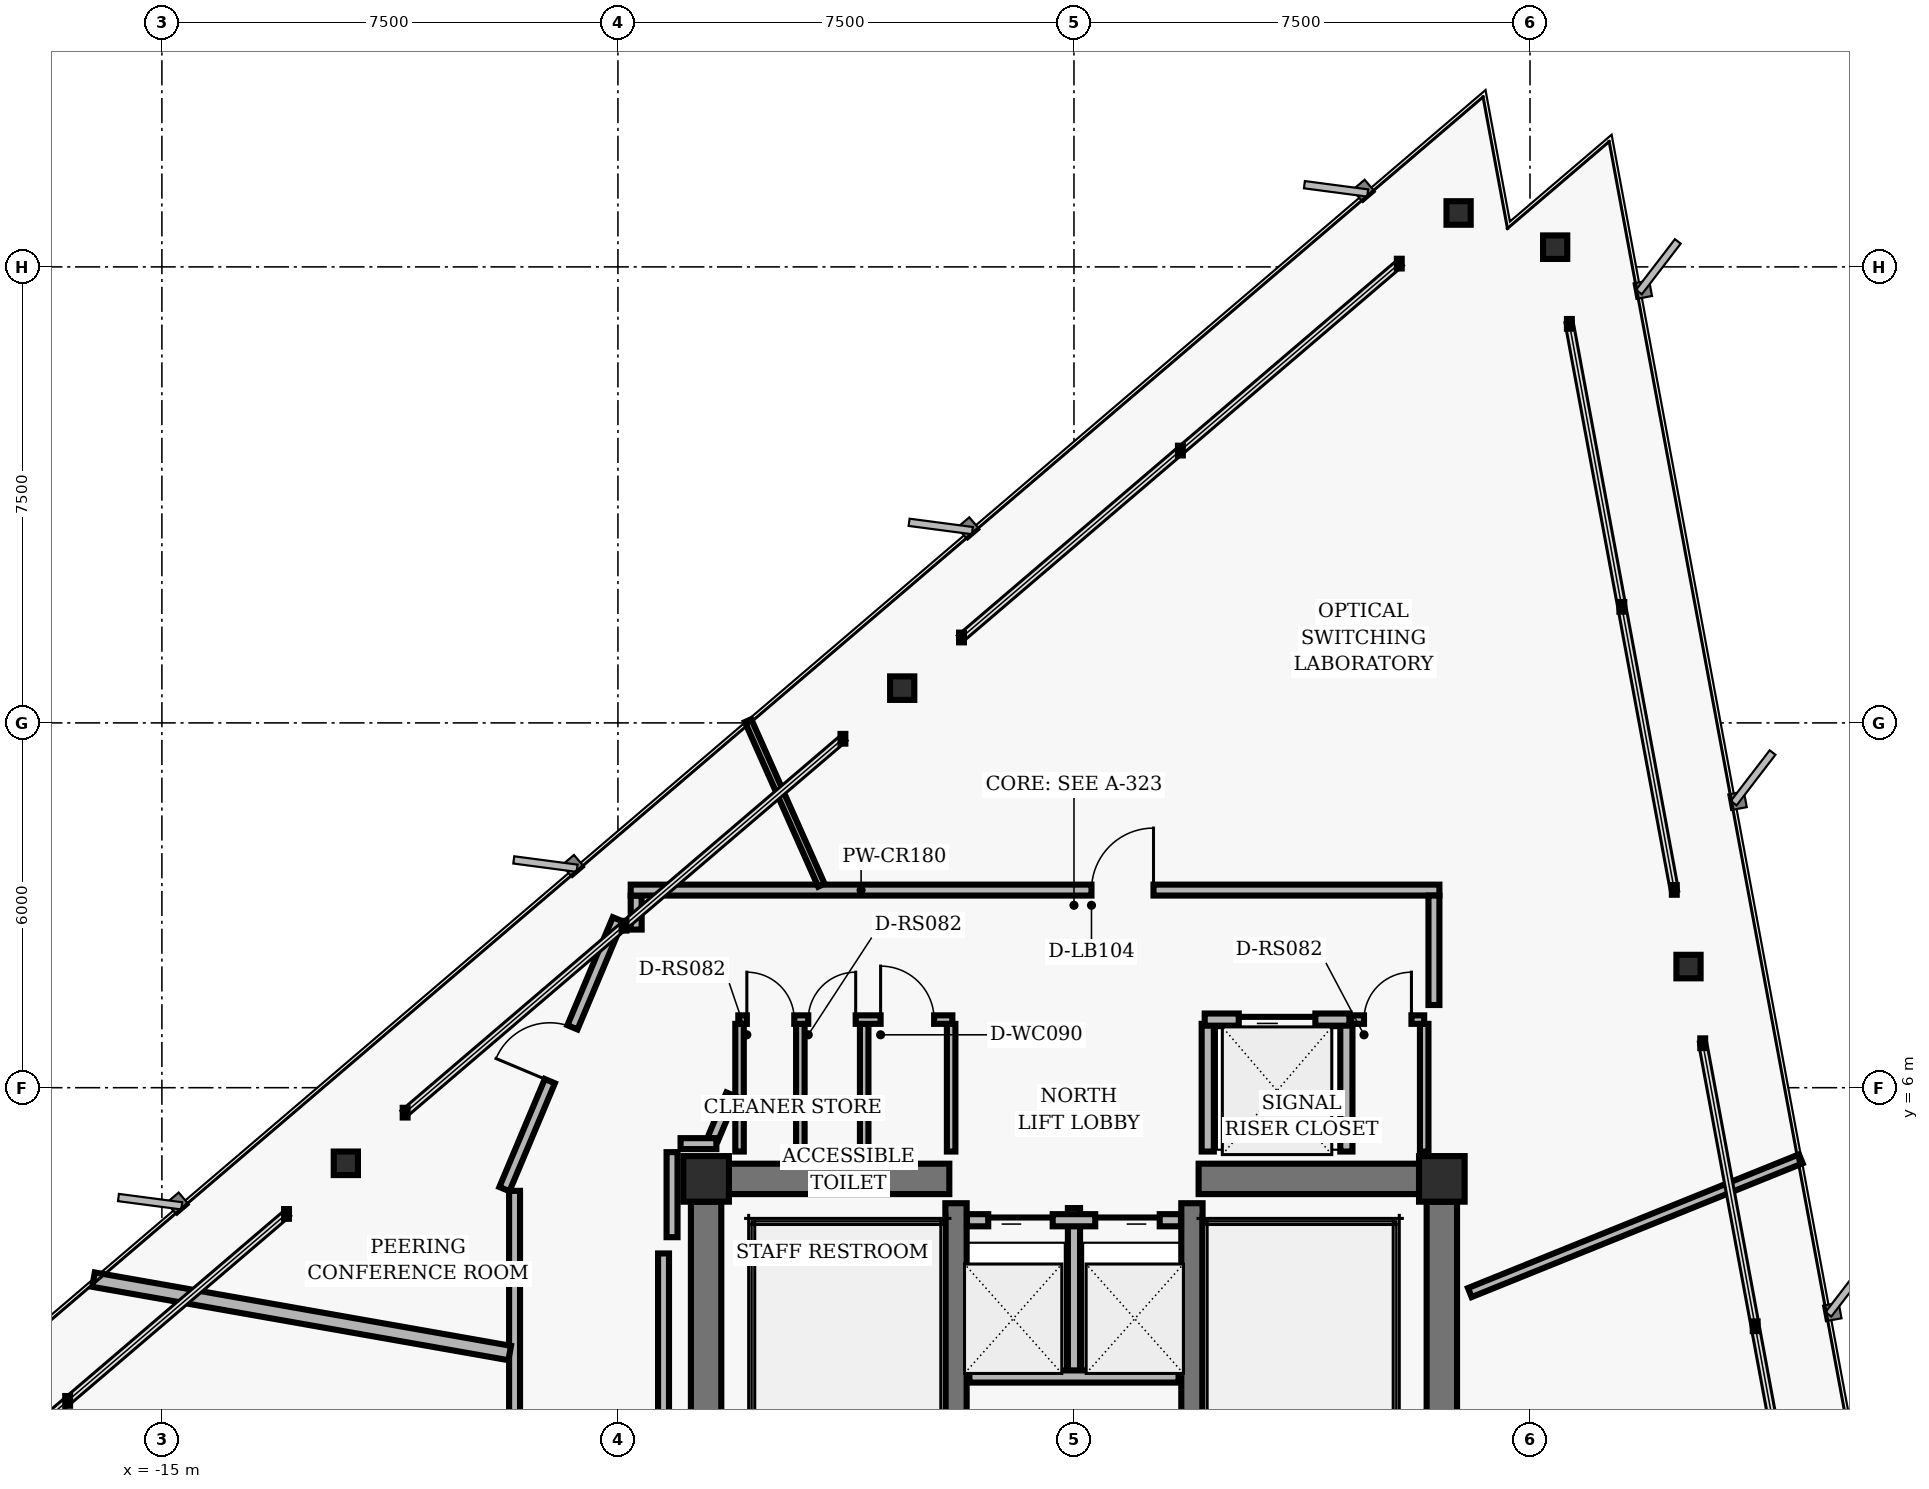
"""IFC4 building model, lengths in metres.
Left out: names, types, materials, properties, quantities, classifications, styles, units other than length and angle.
Written with IfcOpenShell. Run it as: python <this file> out.ifc"""

import sys

from ifc_helpers import new_model, si_unit, direction, frame, frame_2d, origin, origin_2d, place, context, subcontext, project, spatial, rectangle, hollow_rectangle, i_section, extrude, element, fill, save


model = new_model("IFC4")
c1 = context("Model", 3, precision=1e-05, world=origin(), true_north=direction((0.0, 1.0)))
c2 = subcontext(c1, "Body", "Model", "MODEL_VIEW")
j1 = project(units=[si_unit("LENGTHUNIT", "METRE"), si_unit("PLANEANGLEUNIT", "RADIAN")], contexts=[c1])
p1 = place(None, origin())
s1 = spatial("IfcSite", under=j1, at=p1, CompositionType="ELEMENT")
p2 = place(p1, origin())
s2 = spatial("IfcBuilding", under=s1, at=p2, CompositionType="ELEMENT")
p3 = place(p2, frame((0.0, 0.0, 184.48)))
s3 = spatial("IfcBuildingStorey", under=s2, at=p3, CompositionType="ELEMENT", Elevation=184.48)
for number, where, z_axis, x_axis in (
    (1, (-6.05, 4.5, 0.0), (0.0, 0.0, 1.0), (1.0, 0.0, 0.0)),
    (2, (6.05, 4.5, 0.0), (0.0, 0.0, 1.0), (1.0, 0.0, 0.0)),
):
    element("IfcColumn", number, at=place(p3, frame(where, z_axis=z_axis, x_axis=x_axis)), inside=s3, PredefinedType="COLUMN", context=c2, shape_type="SweptSolid", body=[
        extrude(hollow_rectangle(XDim=0.75, YDim=0.75, WallThickness=0.05, InnerFilletRadius=0.02, OuterFilletRadius=0.04, at=origin_2d()), origin(), (0.0, 0.0, 1.0), 3.04),
    ])
for number, where, z_axis, x_axis in (
    (3, (-6.05, 0.375, 0.0), (0.0, 0.0, 1.0), (0.0, 1.0, 0.0)),
    (4, (6.05, 0.375, 0.0), (0.0, 0.0, 1.0), (0.0, 1.0, 0.0)),
):
    element("IfcWall", number, at=place(p3, frame(where, z_axis=z_axis, x_axis=x_axis)), inside=s3, PredefinedType="SHEAR", context=c2, shape_type="SweptSolid", body=[
        extrude(rectangle(XDim=3.75, YDim=0.5, at=frame_2d((1.875, 0.0))), origin(), (0.0, 0.0, 1.0), 2.798),
    ])
for number, where, z_axis, x_axis in (
    (5, (-1.94, -4.1, 0.0), (0.0, 0.0, 1.0), (0.0, 1.0, 0.0)),
    (6, (1.94, -4.1, 0.0), (0.0, 0.0, 1.0), (0.0, 1.0, 0.0)),
):
    element("IfcWall", number, at=place(p3, frame(where, z_axis=z_axis, x_axis=x_axis)), inside=s3, PredefinedType="SHEAR", context=c2, shape_type="SweptSolid", body=[
        extrude(rectangle(XDim=8.2, YDim=0.35, at=frame_2d((4.1, 0.0))), origin(), (0.0, 0.0, 1.0), 2.798),
    ])
for number, where, z_axis, x_axis in (
    (7, (-5.675, 4.5, 0.0), (0.0, 0.0, 1.0), (1.0, 0.0, 0.0)),
    (8, (2.05, 4.5, 0.0), (0.0, 0.0, 1.0), (1.0, 0.0, 0.0)),
):
    element("IfcWall", number, at=place(p3, frame(where, z_axis=z_axis, x_axis=x_axis)), inside=s3, PredefinedType="SHEAR", context=c2, shape_type="SweptSolid", body=[
        extrude(rectangle(XDim=3.625, YDim=0.5, at=frame_2d((1.812, 0.0))), origin(), (0.0, 0.0, 1.0), 2.798),
    ])
for number, where, z_axis, x_axis in (
    (9, (10.107, 7.992, 0.0), (0.0, 0.0, 1.0), (1.0, 0.0, 0.0)),
    (10, (7.914, 19.824, 0.0), (0.0, 0.0, 1.0), (1.0, 0.0, 0.0)),
    (11, (6.325, 20.387, 0.0), (0.0, 0.0, 1.0), (1.0, 0.0, 0.0)),
    (12, (-2.825, 12.572, 0.0), (0.0, 0.0, 1.0), (1.0, 0.0, 0.0)),
    (13, (-11.975, 4.757, 0.0), (0.0, 0.0, 1.0), (1.0, 0.0, 0.0)),
):
    element("IfcColumn", number, at=place(p3, frame(where, z_axis=z_axis, x_axis=x_axis)), inside=s3, PredefinedType="COLUMN", context=c2, shape_type="SweptSolid", body=[
        extrude(i_section(OverallWidth=0.398, OverallDepth=0.387, WebThickness=0.021, FlangeThickness=0.033, FilletRadius=0.018, at=origin_2d()), origin(), (0.0, 0.0, 1.0), 3.04),
    ])
p4 = place(p3, frame((0.0, 1.25, 0.0), z_axis=(0.0, 0.0, 1.0), x_axis=(0.0, 1.0, 0.0)))
e14 = element("IfcWall", 14, at=p4, inside=s3, PredefinedType="PARTITIONING", context=c2, shape_type="SweptSolid", body=[
    extrude(rectangle(XDim=2.77, YDim=0.2, at=frame_2d((1.385, 0.0))), origin(), (0.0, 0.0, 1.0), 2.773),
])
p5 = place(p3, frame((-1.72, 1.25, 0.0), z_axis=(0.0, 0.0, 1.0), x_axis=(1.0, 0.0, 0.0)))
e15 = element("IfcWall", 15, at=p5, inside=s3, PredefinedType="PARTITIONING", context=c2, shape_type="SweptSolid", body=[
    extrude(rectangle(XDim=3.44, YDim=0.2, at=frame_2d((1.72, 0.0))), origin(), (0.0, 0.0, 1.0), 2.773),
])
p6 = place(p3, frame((-1.76, 3.82, 0.0), z_axis=(0.0, 0.0, 1.0), x_axis=(1.0, 0.0, 0.0)))
e16 = element("IfcWall", 16, at=p6, inside=s3, PredefinedType="PARTITIONING", context=c2, shape_type="SweptSolid", body=[
    extrude(rectangle(XDim=3.52, YDim=0.2, at=frame_2d((1.76, 0.0))), origin(), (0.0, 0.0, 1.0), 2.773),
])
p7 = place(p6, frame((0.35, 0.0, 0.0)))
e17 = element("IfcOpeningElement", 17, at=p7, cuts=e16, PredefinedType="OPENING", context=c2, shape_type="SweptSolid", body=[
    extrude(rectangle(XDim=1.06, YDim=2.04, at=frame_2d((0.53, 1.02))), frame((0.0, 0.11, 0.0), z_axis=(0.0, -1.0, 0.0), x_axis=(1.0, 0.0, 0.0)), (0.0, 0.0, 1.0), 0.22),
])
p8 = place(p6, frame((2.11, 0.0, 0.0)))
e18 = element("IfcOpeningElement", 18, at=p8, cuts=e16, PredefinedType="OPENING", context=c2, shape_type="SweptSolid", body=[
    extrude(rectangle(XDim=1.06, YDim=2.04, at=frame_2d((0.53, 1.02))), frame((0.0, 0.11, 0.0), z_axis=(0.0, -1.0, 0.0), x_axis=(1.0, 0.0, 0.0)), (0.0, 0.0, 1.0), 0.22),
])
for number, where, z_axis, x_axis in (
    (19, (2.2, 4.95, 0.0), (0.0, 0.0, 1.0), (0.0, 1.0, 0.0)),
    (20, (4.48, 4.95, 0.0), (0.0, 0.0, 1.0), (0.0, 1.0, 0.0)),
):
    element("IfcWall", number, at=place(p3, frame(where, z_axis=z_axis, x_axis=x_axis)), inside=s3, PredefinedType="PARTITIONING", context=c2, shape_type="SweptSolid", body=[
        extrude(rectangle(XDim=2.1, YDim=0.2, at=frame_2d((1.05, 0.0))), origin(), (0.0, 0.0, 1.0), 2.773),
    ])
p9 = place(p3, frame((2.15, 7.12, 0.0), z_axis=(0.0, 0.0, 1.0), x_axis=(1.0, 0.0, 0.0)))
e21 = element("IfcWall", 21, at=p9, inside=s3, PredefinedType="PARTITIONING", context=c2, shape_type="SweptSolid", body=[
    extrude(rectangle(XDim=2.38, YDim=0.2, at=frame_2d((1.19, 0.0))), origin(), (0.0, 0.0, 1.0), 2.773),
])
p10 = place(p9, frame((0.56, 0.0, 0.0)))
e22 = element("IfcOpeningElement", 22, at=p10, cuts=e21, PredefinedType="OPENING", context=c2, shape_type="SweptSolid", body=[
    extrude(rectangle(XDim=1.26, YDim=2.06, at=frame_2d((0.63, 1.03))), frame((0.0, 0.11, 0.0), z_axis=(0.0, -1.0, 0.0), x_axis=(1.0, 0.0, 0.0)), (0.0, 0.0, 1.0), 0.22),
])
for number, where, z_axis, x_axis in (
    (23, (-5.5, 4.95, 0.0), (0.0, 0.0, 1.0), (0.0, 1.0, 0.0)),
    (24, (-4.5, 4.95, 0.0), (0.0, 0.0, 1.0), (0.0, 1.0, 0.0)),
    (25, (-3.45, 4.95, 0.0), (0.0, 0.0, 1.0), (0.0, 1.0, 0.0)),
    (26, (-2.02, 4.95, 0.0), (0.0, 0.0, 1.0), (0.0, 1.0, 0.0)),
):
    element("IfcWall", number, at=place(p3, frame(where, z_axis=z_axis, x_axis=x_axis)), inside=s3, PredefinedType="PARTITIONING", context=c2, shape_type="SweptSolid", body=[
        extrude(rectangle(XDim=2.1, YDim=0.14, at=frame_2d((1.05, 0.0))), origin(), (0.0, 0.0, 1.0), 2.773),
    ])
p11 = place(p3, frame((-5.52, 7.12, 0.0), z_axis=(0.0, 0.0, 1.0), x_axis=(1.0, 0.0, 0.0)))
e27 = element("IfcWall", 27, at=p11, inside=s3, PredefinedType="PARTITIONING", context=c2, shape_type="SweptSolid", body=[
    extrude(rectangle(XDim=3.52, YDim=0.14, at=frame_2d((1.76, 0.0))), origin(), (0.0, 0.0, 1.0), 2.773),
])
p12 = place(p11, frame((0.14, 0.0, 0.0)))
e28 = element("IfcOpeningElement", 28, at=p12, cuts=e27, PredefinedType="OPENING", context=c2, shape_type="SweptSolid", body=[
    extrude(rectangle(XDim=0.78, YDim=2.01, at=frame_2d((0.39, 1.005))), frame((0.0, 0.08, 0.0), z_axis=(0.0, -1.0, 0.0), x_axis=(1.0, 0.0, 0.0)), (0.0, 0.0, 1.0), 0.16),
])
p13 = place(p11, frame((1.15, 0.0, 0.0)))
e29 = element("IfcOpeningElement", 29, at=p13, cuts=e27, PredefinedType="OPENING", context=c2, shape_type="SweptSolid", body=[
    extrude(rectangle(XDim=0.78, YDim=2.01, at=frame_2d((0.39, 1.005))), frame((0.0, 0.08, 0.0), z_axis=(0.0, -1.0, 0.0), x_axis=(1.0, 0.0, 0.0)), (0.0, 0.0, 1.0), 0.16),
])
p14 = place(p11, frame((2.34, 0.0, 0.0)))
e30 = element("IfcOpeningElement", 30, at=p14, cuts=e27, PredefinedType="OPENING", context=c2, shape_type="SweptSolid", body=[
    extrude(rectangle(XDim=0.88, YDim=2.02, at=frame_2d((0.44, 1.01))), frame((0.0, 0.08, 0.0), z_axis=(0.0, -1.0, 0.0), x_axis=(1.0, 0.0, 0.0)), (0.0, 0.0, 1.0), 0.16),
])
p15 = place(p3, frame((5.76, 4.95, 0.0), z_axis=(0.0, 0.0, 1.0), x_axis=(0.0, 1.0, 0.0)))
e31 = element("IfcWall", 31, at=p15, inside=s3, PredefinedType="PARTITIONING", context=c2, shape_type="SweptSolid", body=[
    extrude(rectangle(XDim=2.1, YDim=0.14, at=frame_2d((1.05, 0.0))), origin(), (0.0, 0.0, 1.0), 2.253),
])
p16 = place(p3, frame((4.56, 7.12, 0.0), z_axis=(0.0, 0.0, 1.0), x_axis=(1.0, 0.0, 0.0)))
e32 = element("IfcWall", 32, at=p16, inside=s3, PredefinedType="PARTITIONING", context=c2, shape_type="SweptSolid", body=[
    extrude(rectangle(XDim=1.2, YDim=0.14, at=frame_2d((0.6, 0.0))), origin(), (0.0, 0.0, 1.0), 2.773),
])
p17 = place(p16, frame((0.21, 0.0, 0.0)))
e33 = element("IfcOpeningElement", 33, at=p17, cuts=e32, PredefinedType="OPENING", context=c2, shape_type="SweptSolid", body=[
    extrude(rectangle(XDim=0.78, YDim=2.01, at=frame_2d((0.39, 1.005))), frame((0.0, 0.08, 0.0), z_axis=(0.0, -1.0, 0.0), x_axis=(1.0, 0.0, 0.0)), (0.0, 0.0, 1.0), 0.16),
])
p18 = place(p3, frame((-9.2, -4.303, 0.0), z_axis=(0.0, 0.0, 1.0), x_axis=(0.0, 1.0, 0.0)))
e34 = element("IfcWall", 34, at=p18, inside=s3, PredefinedType="PARTITIONING", context=c2, shape_type="SweptSolid", body=[
    extrude(rectangle(XDim=8.607, YDim=0.18, at=frame_2d((4.303, 0.0))), origin(), (0.0, 0.0, 1.0), 2.773),
])
p19 = place(p18, frame((2.619, 0.0, 0.0)))
e35 = element("IfcOpeningElement", 35, at=p19, cuts=e34, PredefinedType="OPENING", context=c2, shape_type="SweptSolid", body=[
    extrude(rectangle(XDim=0.96, YDim=2.02, at=frame_2d((0.48, 1.01))), frame((0.0, 0.1, 0.0), z_axis=(0.0, -1.0, 0.0), x_axis=(1.0, 0.0, 0.0)), (0.0, 0.0, 1.0), 0.2),
])
p20 = place(p3, frame((-9.367, 4.332, 0.0), z_axis=(0.0, 0.0, 1.0), x_axis=(0.387573945081, 0.921838617706, 0.0)))
e36 = element("IfcWall", 36, at=p20, inside=s3, PredefinedType="PARTITIONING", context=c2, shape_type="SweptSolid", body=[
    extrude(rectangle(XDim=4.813, YDim=0.18, at=frame_2d((2.407, 0.0))), origin(), (0.0, 0.0, 1.0), 2.395),
])
p21 = place(p20, frame((1.927, 0.0, 0.0)))
e37 = element("IfcOpeningElement", 37, at=p21, cuts=e36, PredefinedType="OPENING", context=c2, shape_type="SweptSolid", body=[
    extrude(rectangle(XDim=0.96, YDim=2.02, at=frame_2d((0.48, 1.01))), frame((0.0, 0.1, 0.0), z_axis=(0.0, -1.0, 0.0), x_axis=(1.0, 0.0, 0.0)), (0.0, 0.0, 1.0), 0.2),
])
p22 = place(p3, frame((-7.2, 8.601, 0.0), z_axis=(0.0, 0.0, 1.0), x_axis=(0.0, 1.0, 0.0)))
e38 = element("IfcWall", 38, at=p22, inside=s3, PredefinedType="PARTITIONING", context=c2, shape_type="SweptSolid", body=[
    extrude(rectangle(XDim=0.559, YDim=0.18, at=frame_2d((0.28, 0.0))), origin(), (0.0, 0.0, 1.0), 2.773),
])
p23 = place(p3, frame((-7.29, 9.25, 0.0), z_axis=(0.0, 0.0, 1.0), x_axis=(1.0, 0.0, 0.0)))
e39 = element("IfcWall", 39, at=p23, inside=s3, PredefinedType="PARTITIONING", context=c2, shape_type="SweptSolid", body=[
    extrude(rectangle(XDim=13.3, YDim=0.18, at=frame_2d((6.65, 0.0))), origin(), (0.0, 0.0, 1.0), 2.773),
])
p24 = place(p23, frame((7.578, 0.0, 0.0)))
e40 = element("IfcOpeningElement", 40, at=p24, cuts=e39, PredefinedType="OPENING", context=c2, shape_type="SweptSolid", body=[
    extrude(rectangle(XDim=1.02, YDim=2.02, at=frame_2d((0.51, 1.01))), frame((0.0, 0.1, 0.0), z_axis=(0.0, -1.0, 0.0), x_axis=(1.0, 0.0, 0.0)), (0.0, 0.0, 1.0), 0.2),
])
p25 = place(p3, frame((5.92, 9.16, 0.0), z_axis=(0.0, 0.0, 1.0), x_axis=(0.0, -1.0, 0.0)))
e41 = element("IfcWall", 41, at=p25, inside=s3, PredefinedType="PARTITIONING", context=c2, shape_type="SweptSolid", body=[
    extrude(rectangle(XDim=1.8, YDim=0.18, at=frame_2d((0.9, 0.0))), origin(), (0.0, 0.0, 1.0), 2.253),
])
p26 = place(p3, frame((-5.632, 5.887, 0.0), z_axis=(0.0, 0.0, 1.0), x_axis=(-0.387792833522, -0.921746558588, 0.0)))
e42 = element("IfcWall", 42, at=p26, inside=s3, PredefinedType="PARTITIONING", context=c2, shape_type="SweptSolid", body=[
    extrude(rectangle(XDim=0.785, YDim=0.18, at=frame_2d((0.393, 0.0))), origin(), (0.0, 0.0, 1.0), 2.773),
])
p27 = place(p3, frame((-5.881, 5.08, 0.0), z_axis=(0.0, 0.0, 1.0), x_axis=(-1.0, 0.0, 0.0)))
e43 = element("IfcWall", 43, at=p27, inside=s3, PredefinedType="PARTITIONING", context=c2, shape_type="SweptSolid", body=[
    extrude(rectangle(XDim=0.589, YDim=0.18, at=frame_2d((0.294, 0.0))), origin(), (0.0, 0.0, 1.0), 2.773),
])
p28 = place(p3, frame((-6.61, 4.94, 0.0), z_axis=(0.0, 0.0, 1.0), x_axis=(0.0, -1.0, 0.0)))
e44 = element("IfcWall", 44, at=p28, inside=s3, PredefinedType="PARTITIONING", context=c2, shape_type="SweptSolid", body=[
    extrude(rectangle(XDim=1.399, YDim=0.18, at=frame_2d((0.699, 0.0))), origin(), (0.0, 0.0, 1.0), 2.773),
])
p29 = place(p3, frame((-6.75, 3.273, 0.0), z_axis=(0.0, 0.0, 1.0), x_axis=(0.0, -1.0, 0.0)))
e45 = element("IfcWall", 45, at=p29, inside=s3, PredefinedType="PARTITIONING", context=c2, shape_type="SweptSolid", body=[
    extrude(rectangle(XDim=6.547, YDim=0.18, at=frame_2d((3.273, 0.0))), origin(), (0.0, 0.0, 1.0), 2.773),
])
p30 = place(p3, frame((6.51, 2.63, 0.0), z_axis=(0.0, 0.0, 1.0), x_axis=(0.927189354085, 0.374592981342, 0.0)))
e46 = element("IfcWall", 46, at=p30, inside=s3, PredefinedType="PARTITIONING", context=c2, shape_type="SweptSolid", body=[
    extrude(rectangle(XDim=5.872, YDim=0.16, at=frame_2d((2.936, 0.0))), origin(), (0.0, 0.0, 1.0), 2.773),
])
p31 = place(p3, frame((-4.154, 9.33, 0.0), z_axis=(0.0, 0.0, 1.0), x_axis=(-0.406726956158, 0.913549770475, 0.0)))
e47 = element("IfcWall", 47, at=p31, inside=s3, PredefinedType="MOVABLE", context=c2, shape_type="SweptSolid", body=[
    extrude(rectangle(XDim=2.963, YDim=0.115, at=frame_2d((1.482, 0.0))), origin(), (0.0, 0.0, 1.0), 2.773),
])
p32 = place(p3, frame((-9.28, 1.636, 0.0), z_axis=(0.0, 0.0, 1.0), x_axis=(-0.984803709336, 0.173671108934, 0.0)))
e48 = element("IfcWall", 48, at=p32, inside=s3, PredefinedType="PARTITIONING", context=c2, shape_type="SweptSolid", body=[
    extrude(rectangle(XDim=6.95, YDim=0.24, at=frame_2d((3.475, 0.0))), origin(), (0.0, 0.0, 1.0), 2.773),
])
p33 = place(p7, origin())
e49 = element("IfcDoor", 49, at=p33, inside=s3, OperationType="SLIDING_TO_LEFT", PredefinedType="DOOR", context=c2, shape_type="SweptSolid", body=[
    extrude(rectangle(XDim=1.06, YDim=2.04, at=frame_2d((0.53, 1.02))), frame((0.0, 0.025, 0.0), z_axis=(0.0, -1.0, 0.0), x_axis=(1.0, 0.0, 0.0)), (0.0, 0.0, 1.0), 0.05),
])
fill(e17, e49)
p34 = place(p8, origin())
e50 = element("IfcDoor", 50, at=p34, inside=s3, OperationType="SLIDING_TO_RIGHT", PredefinedType="DOOR", context=c2, shape_type="SweptSolid", body=[
    extrude(rectangle(XDim=1.06, YDim=2.04, at=frame_2d((0.53, 1.02))), frame((0.0, 0.025, 0.0), z_axis=(0.0, -1.0, 0.0), x_axis=(1.0, 0.0, 0.0)), (0.0, 0.0, 1.0), 0.05),
])
fill(e18, e50)
p35 = place(p10, origin())
e51 = element("IfcDoor", 51, at=p35, inside=s3, OperationType="SLIDING_TO_LEFT", PredefinedType="DOOR", context=c2, shape_type="SweptSolid", body=[
    extrude(rectangle(XDim=1.26, YDim=2.06, at=frame_2d((0.63, 1.03))), frame((0.0, 0.025, 0.0), z_axis=(0.0, -1.0, 0.0), x_axis=(1.0, 0.0, 0.0)), (0.0, 0.0, 1.0), 0.05),
])
fill(e22, e51)
p36 = place(p12, origin())
e52 = element("IfcDoor", 52, at=p36, inside=s3, OperationType="SINGLE_SWING_LEFT", PredefinedType="DOOR", context=c2, shape_type="SweptSolid", body=[
    extrude(rectangle(XDim=0.78, YDim=2.01, at=frame_2d((0.39, 1.005))), frame((0.0, 0.025, 0.0), z_axis=(0.0, -1.0, 0.0), x_axis=(1.0, 0.0, 0.0)), (0.0, 0.0, 1.0), 0.05),
])
fill(e28, e52)
p37 = place(p13, origin())
e53 = element("IfcDoor", 53, at=p37, inside=s3, OperationType="SINGLE_SWING_RIGHT", PredefinedType="DOOR", context=c2, shape_type="SweptSolid", body=[
    extrude(rectangle(XDim=0.78, YDim=2.01, at=frame_2d((0.39, 1.005))), frame((0.0, 0.025, 0.0), z_axis=(0.0, -1.0, 0.0), x_axis=(1.0, 0.0, 0.0)), (0.0, 0.0, 1.0), 0.05),
])
fill(e29, e53)
p38 = place(p14, origin())
e54 = element("IfcDoor", 54, at=p38, inside=s3, OperationType="SINGLE_SWING_LEFT", PredefinedType="DOOR", context=c2, shape_type="SweptSolid", body=[
    extrude(rectangle(XDim=0.88, YDim=2.02, at=frame_2d((0.44, 1.01))), frame((0.0, 0.025, 0.0), z_axis=(0.0, -1.0, 0.0), x_axis=(1.0, 0.0, 0.0)), (0.0, 0.0, 1.0), 0.05),
])
fill(e30, e54)
p39 = place(p17, origin())
e55 = element("IfcDoor", 55, at=p39, inside=s3, OperationType="SINGLE_SWING_RIGHT", PredefinedType="DOOR", context=c2, shape_type="SweptSolid", body=[
    extrude(rectangle(XDim=0.78, YDim=2.01, at=frame_2d((0.39, 1.005))), frame((0.0, 0.025, 0.0), z_axis=(0.0, -1.0, 0.0), x_axis=(1.0, 0.0, 0.0)), (0.0, 0.0, 1.0), 0.05),
])
fill(e33, e55)
p40 = place(p24, origin())
e56 = element("IfcDoor", 56, at=p40, inside=s3, OperationType="SINGLE_SWING_RIGHT", PredefinedType="DOOR", context=c2, shape_type="SweptSolid", body=[
    extrude(rectangle(XDim=1.02, YDim=2.02, at=frame_2d((0.51, 1.01))), frame((0.0, 0.025, 0.0), z_axis=(0.0, -1.0, 0.0), x_axis=(1.0, 0.0, 0.0)), (0.0, 0.0, 1.0), 0.05),
])
fill(e40, e56)
p41 = place(p21, origin())
e57 = element("IfcDoor", 57, at=p41, inside=s3, OperationType="SINGLE_SWING_LEFT", PredefinedType="DOOR", context=c2, shape_type="SweptSolid", body=[
    extrude(rectangle(XDim=0.96, YDim=2.02, at=frame_2d((0.48, 1.01))), frame((0.0, 0.025, 0.0), z_axis=(0.0, -1.0, 0.0), x_axis=(1.0, 0.0, 0.0)), (0.0, 0.0, 1.0), 0.05),
])
fill(e37, e57)
save(model, sys.argv[1])
